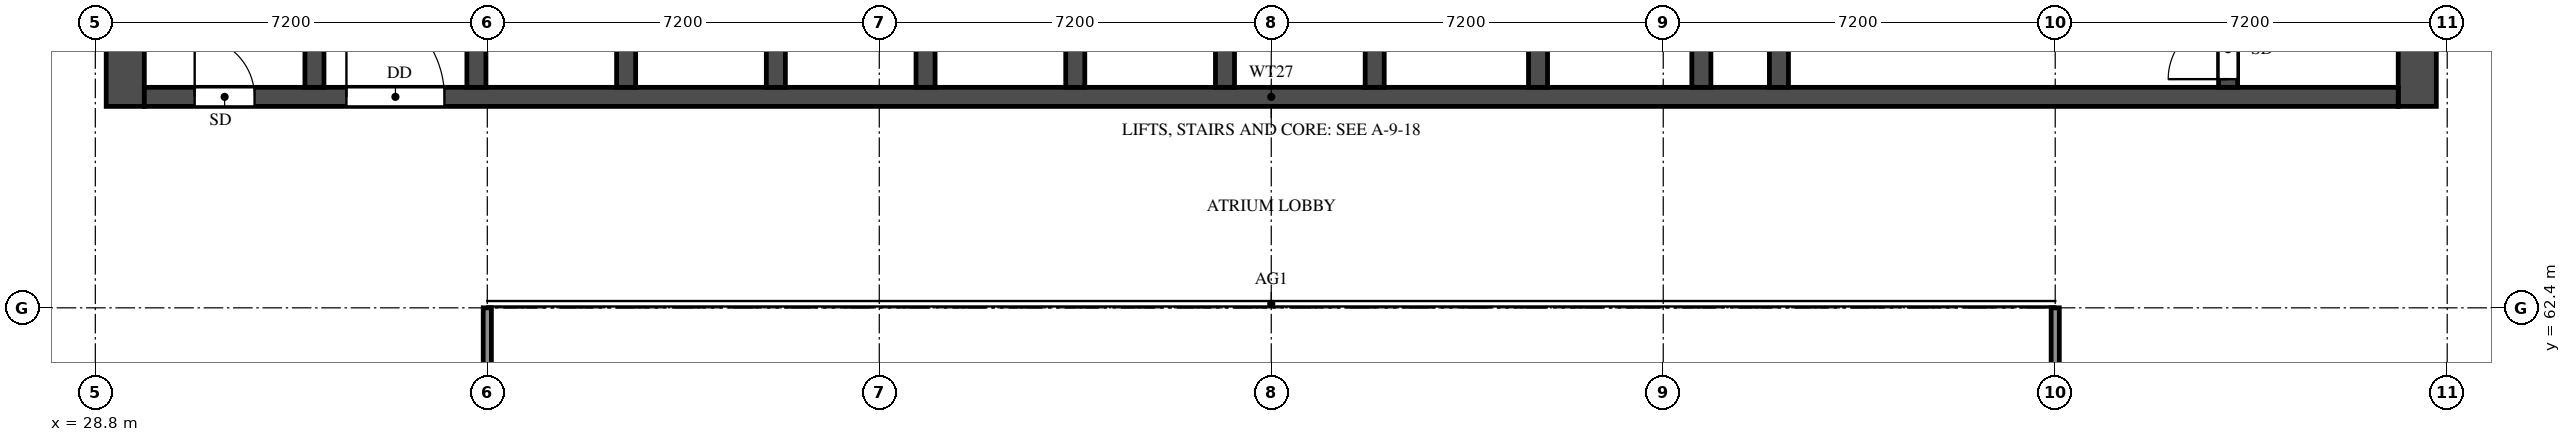
"""IFC4 building model, lengths in metres.
Left out: names, types, materials, properties, quantities, classifications, styles, units other than length and angle.
Written with IfcOpenShell. Run it as: python <this file> out.ifc"""

import sys

from ifc_helpers import new_model, si_unit, direction, frame, frame_2d, origin, place, context, subcontext, project, spatial, rectangle, extrude, element, fill, save


model = new_model("IFC4")
c1 = context("Model", 3, precision=1e-05, world=origin(), true_north=direction((0.0, 1.0)))
c2 = subcontext(c1, "Body", "Model", "MODEL_VIEW")
j1 = project(units=[si_unit("LENGTHUNIT", "METRE"), si_unit("PLANEANGLEUNIT", "RADIAN")], contexts=[c1])
p1 = place(None, origin())
s1 = spatial("IfcSite", under=j1, at=p1, CompositionType="ELEMENT")
p2 = place(p1, origin())
s2 = spatial("IfcBuilding", under=s1, at=p2, CompositionType="ELEMENT")
p3 = place(p2, frame((0.0, 0.0, 127.0)))
s3 = spatial("IfcBuildingStorey", under=s2, at=p3, CompositionType="ELEMENT", Elevation=127.0)
for number, where, z_axis, x_axis in (
    (1, (29.35, 66.1, 0.0), (0.0, 0.0, 1.0), (0.0, 1.0, 0.0)),
    (2, (71.45, 66.1, 0.0), (0.0, 0.0, 1.0), (0.0, 1.0, 0.0)),
):
    element("IfcWall", number, at=place(p3, frame(where, z_axis=z_axis, x_axis=x_axis)), inside=s3, PredefinedType="SHEAR", context=c2, shape_type="SweptSolid", body=[
        extrude(rectangle(XDim=11.9, YDim=0.7, at=frame_2d((5.95, 0.0))), origin(), (0.0, 0.0, 1.0), 3.2),
    ])
p4 = place(p3, frame((29.7, 66.275, 0.0), z_axis=(0.0, 0.0, 1.0), x_axis=(1.0, 0.0, 0.0)))
e3 = element("IfcWall", 3, at=p4, inside=s3, PredefinedType="SHEAR", context=c2, shape_type="SweptSolid", body=[
    extrude(rectangle(XDim=41.4, YDim=0.35, at=frame_2d((20.7, 0.0))), origin(), (0.0, 0.0, 1.0), 3.2),
])
p5 = place(p4, frame((0.925, 0.0, 0.0)))
e4 = element("IfcOpeningElement", 4, at=p5, cuts=e3, PredefinedType="OPENING", context=c2, shape_type="SweptSolid", body=[
    extrude(rectangle(XDim=1.1, YDim=2.1, at=frame_2d((0.55, 1.05))), frame((0.0, 0.185, 0.0), z_axis=(0.0, -1.0, 0.0), x_axis=(1.0, 0.0, 0.0)), (0.0, 0.0, 1.0), 0.37),
])
p6 = place(p4, frame((3.712, 0.0, 0.0)))
e5 = element("IfcOpeningElement", 5, at=p6, cuts=e3, PredefinedType="OPENING", context=c2, shape_type="SweptSolid", body=[
    extrude(rectangle(XDim=1.8, YDim=2.1, at=frame_2d((0.9, 1.05))), frame((0.0, 0.185, 0.0), z_axis=(0.0, -1.0, 0.0), x_axis=(1.0, 0.0, 0.0)), (0.0, 0.0, 1.0), 0.37),
])
p7 = place(p3, frame((32.825, 66.45, 0.0), z_axis=(0.0, 0.0, 1.0), x_axis=(0.0, 1.0, 0.0)))
e6 = element("IfcWall", 6, at=p7, inside=s3, PredefinedType="SHEAR", context=c2, shape_type="SweptSolid", body=[
    extrude(rectangle(XDim=10.85, YDim=0.35, at=frame_2d((5.425, 0.0))), origin(), (0.0, 0.0, 1.0), 3.2),
])
p8 = place(p3, frame((67.975, 66.45, 0.0), z_axis=(0.0, 0.0, 1.0), x_axis=(0.0, 1.0, 0.0)))
e7 = element("IfcWall", 7, at=p8, inside=s3, PredefinedType="SHEAR", context=c2, shape_type="SweptSolid", body=[
    extrude(rectangle(XDim=10.85, YDim=0.35, at=frame_2d((5.425, 0.0))), origin(), (0.0, 0.0, 1.0), 3.2),
])
p9 = place(p8, frame((0.15, 0.0, 0.0)))
e8 = element("IfcOpeningElement", 8, at=p9, cuts=e7, PredefinedType="OPENING", context=c2, shape_type="SweptSolid", body=[
    extrude(rectangle(XDim=1.1, YDim=2.1, at=frame_2d((0.55, 1.05))), frame((0.0, 0.185, 0.0), z_axis=(0.0, -1.0, 0.0), x_axis=(1.0, 0.0, 0.0)), (0.0, 0.0, 1.0), 0.37),
])
p10 = place(p3, frame((59.725, 66.45, 0.0), z_axis=(0.0, 0.0, 1.0), x_axis=(0.0, 1.0, 0.0)))
e9 = element("IfcWall", 9, at=p10, inside=s3, PredefinedType="SHEAR", context=c2, shape_type="SweptSolid", body=[
    extrude(rectangle(XDim=6.125, YDim=0.35, at=frame_2d((3.062, 0.0))), origin(), (0.0, 0.0, 1.0), 3.2),
])
p11 = place(p10, frame((3.85, 0.0, 0.0)))
e10 = element("IfcOpeningElement", 10, at=p11, cuts=e9, PredefinedType="OPENING", context=c2, shape_type="SweptSolid", body=[
    extrude(rectangle(XDim=1.2, YDim=2.1, at=frame_2d((0.6, 1.05))), frame((0.0, 0.185, 0.0), z_axis=(0.0, -1.0, 0.0), x_axis=(1.0, 0.0, 0.0)), (0.0, 0.0, 1.0), 0.37),
])
for number, where, z_axis, x_axis in (
    (11, (35.8, 66.45, 0.0), (0.0, 0.0, 1.0), (0.0, 1.0, 0.0)),
    (12, (38.55, 66.45, 0.0), (0.0, 0.0, 1.0), (0.0, 1.0, 0.0)),
    (13, (41.3, 66.45, 0.0), (0.0, 0.0, 1.0), (0.0, 1.0, 0.0)),
    (14, (44.05, 66.45, 0.0), (0.0, 0.0, 1.0), (0.0, 1.0, 0.0)),
    (15, (46.8, 66.45, 0.0), (0.0, 0.0, 1.0), (0.0, 1.0, 0.0)),
    (16, (49.55, 66.45, 0.0), (0.0, 0.0, 1.0), (0.0, 1.0, 0.0)),
    (17, (52.3, 66.45, 0.0), (0.0, 0.0, 1.0), (0.0, 1.0, 0.0)),
    (18, (55.3, 66.45, 0.0), (0.0, 0.0, 1.0), (0.0, 1.0, 0.0)),
    (19, (58.3, 66.45, 0.0), (0.0, 0.0, 1.0), (0.0, 1.0, 0.0)),
):
    element("IfcWall", number, at=place(p3, frame(where, z_axis=z_axis, x_axis=x_axis)), inside=s3, PredefinedType="SHEAR", context=c2, shape_type="SweptSolid", body=[
        extrude(rectangle(XDim=2.425, YDim=0.35, at=frame_2d((1.212, 0.0))), origin(), (0.0, 0.0, 1.0), 3.2),
    ])
for number, where, z_axis, x_axis in (
    (20, (36.0, 48.0, 0.0), (0.0, 0.0, 1.0), (0.0, 1.0, 0.0)),
    (21, (64.8, 48.0, 0.0), (0.0, 0.0, 1.0), (0.0, 1.0, 0.0)),
):
    element("IfcWall", number, at=place(p3, frame(where, z_axis=z_axis, x_axis=x_axis)), inside=s3, PredefinedType="SOLIDWALL", context=c2, shape_type="SweptSolid", body=[
        extrude(rectangle(XDim=14.4, YDim=0.15, at=frame_2d((7.2, 0.0))), origin(), (0.0, 0.0, 1.0), 2.3),
    ])
p12 = place(p5, origin())
e22 = element("IfcDoor", 22, at=p12, inside=s3, OperationType="SINGLE_SWING_LEFT", PredefinedType="DOOR", context=c2, shape_type="SweptSolid", body=[
    extrude(rectangle(XDim=1.1, YDim=2.1, at=frame_2d((0.55, 1.05))), frame((0.0, 0.025, 0.0), z_axis=(0.0, -1.0, 0.0), x_axis=(1.0, 0.0, 0.0)), (0.0, 0.0, 1.0), 0.05),
])
fill(e4, e22)
p13 = place(p9, origin())
e23 = element("IfcDoor", 23, at=p13, inside=s3, OperationType="SINGLE_SWING_LEFT", PredefinedType="DOOR", context=c2, shape_type="SweptSolid", body=[
    extrude(rectangle(XDim=1.1, YDim=2.1, at=frame_2d((0.55, 1.05))), frame((0.0, 0.025, 0.0), z_axis=(0.0, -1.0, 0.0), x_axis=(1.0, 0.0, 0.0)), (0.0, 0.0, 1.0), 0.05),
])
fill(e8, e23)
p14 = place(p6, origin())
e24 = element("IfcDoor", 24, at=p14, inside=s3, OperationType="DOUBLE_DOOR_SINGLE_SWING", PredefinedType="DOOR", context=c2, shape_type="SweptSolid", body=[
    extrude(rectangle(XDim=1.8, YDim=2.1, at=frame_2d((0.9, 1.05))), frame((0.0, 0.025, 0.0), z_axis=(0.0, -1.0, 0.0), x_axis=(1.0, 0.0, 0.0)), (0.0, 0.0, 1.0), 0.05),
])
fill(e5, e24)
save(model, sys.argv[1])
